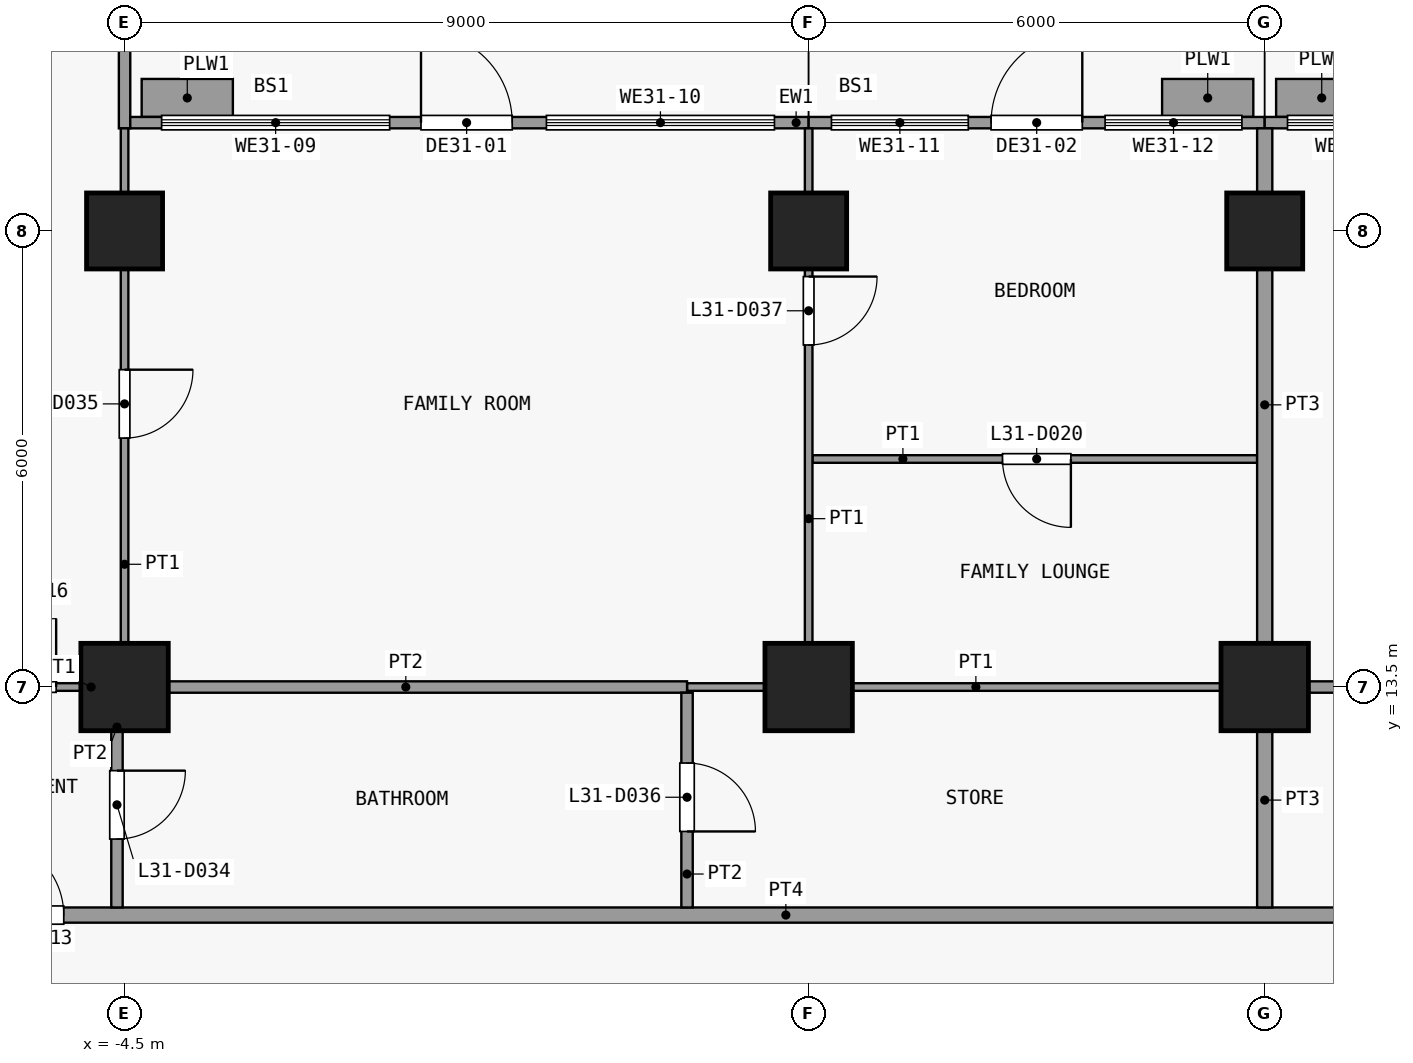
"""IFC4 building model, lengths in metres.
Left out: names, types, materials, properties, quantities, classifications, styles, units other than length and angle.
Written with IfcOpenShell. Run it as: python <this file> out.ifc"""

import sys

from ifc_helpers import new_model, si_unit, direction, frame, frame_2d, origin, origin_2d, place, context, subcontext, project, spatial, rectangle, extrude, element, fill, save


model = new_model("IFC4")
c1 = context("Model", 3, precision=1e-05, world=origin(), true_north=direction((0.0, 1.0)))
c2 = subcontext(c1, "Body", "Model", "MODEL_VIEW")
j1 = project(units=[si_unit("LENGTHUNIT", "METRE"), si_unit("PLANEANGLEUNIT", "RADIAN")], contexts=[c1])
p1 = place(None, origin())
s1 = spatial("IfcSite", under=j1, at=p1, CompositionType="ELEMENT")
p2 = place(p1, origin())
s2 = spatial("IfcBuilding", under=s1, at=p2, CompositionType="ELEMENT")
p3 = place(p2, frame((0.0, 0.0, 124.3)))
s3 = spatial("IfcBuildingStorey", under=s2, at=p3, CompositionType="ELEMENT", Elevation=124.3)
p4 = place(p3, frame((-4.5, 13.5, 0.0), z_axis=(0.0, 0.0, 1.0), x_axis=(1.0, 0.0, 0.0)))
e1 = element("IfcColumn", 1, at=p4, inside=s3, PredefinedType="COLUMN", context=c2, shape_type="SweptSolid", body=[
    extrude(rectangle(XDim=1.15, YDim=1.15, at=origin_2d()), origin(), (0.0, 0.0, 1.0), 3.6),
])
p5 = place(p3, frame((-4.5, 19.5, 0.0), z_axis=(0.0, 0.0, 1.0), x_axis=(1.0, 0.0, 0.0)))
e2 = element("IfcColumn", 2, at=p5, inside=s3, PredefinedType="COLUMN", context=c2, shape_type="SweptSolid", body=[
    extrude(rectangle(XDim=1.0, YDim=1.0, at=origin_2d()), origin(), (0.0, 0.0, 1.0), 3.6),
])
p6 = place(p3, frame((4.5, 13.5, 0.0), z_axis=(0.0, 0.0, 1.0), x_axis=(1.0, 0.0, 0.0)))
e3 = element("IfcColumn", 3, at=p6, inside=s3, PredefinedType="COLUMN", context=c2, shape_type="SweptSolid", body=[
    extrude(rectangle(XDim=1.15, YDim=1.15, at=origin_2d()), origin(), (0.0, 0.0, 1.0), 3.6),
])
p7 = place(p3, frame((4.5, 19.5, 0.0), z_axis=(0.0, 0.0, 1.0), x_axis=(1.0, 0.0, 0.0)))
e4 = element("IfcColumn", 4, at=p7, inside=s3, PredefinedType="COLUMN", context=c2, shape_type="SweptSolid", body=[
    extrude(rectangle(XDim=1.0, YDim=1.0, at=origin_2d()), origin(), (0.0, 0.0, 1.0), 3.6),
])
p8 = place(p3, frame((10.5, 13.5, 0.0), z_axis=(0.0, 0.0, 1.0), x_axis=(1.0, 0.0, 0.0)))
e5 = element("IfcColumn", 5, at=p8, inside=s3, PredefinedType="COLUMN", context=c2, shape_type="SweptSolid", body=[
    extrude(rectangle(XDim=1.15, YDim=1.15, at=origin_2d()), origin(), (0.0, 0.0, 1.0), 3.6),
])
p9 = place(p3, frame((10.5, 19.5, 0.0), z_axis=(0.0, 0.0, 1.0), x_axis=(1.0, 0.0, 0.0)))
e6 = element("IfcColumn", 6, at=p9, inside=s3, PredefinedType="COLUMN", context=c2, shape_type="SweptSolid", body=[
    extrude(rectangle(XDim=1.0, YDim=1.0, at=origin_2d()), origin(), (0.0, 0.0, 1.0), 3.6),
])
p10 = place(p3, frame((-4.5, 20.85, 0.0), z_axis=(0.0, 0.0, 1.0), x_axis=(0.0, 1.0, 0.0)))
e7 = element("IfcWall", 7, at=p10, inside=s3, PredefinedType="SOLIDWALL", context=c2, shape_type="SweptSolid", body=[
    extrude(rectangle(XDim=2.55, YDim=0.15, at=frame_2d((1.275, 0.0))), origin(), (0.0, 0.0, 1.0), 3.3),
])
p11 = place(p3, frame((-4.425, 20.925, 0.0), z_axis=(0.0, 0.0, 1.0), x_axis=(1.0, 0.0, 0.0)))
e8 = element("IfcWall", 8, at=p11, inside=s3, PredefinedType="SOLIDWALL", context=c2, shape_type="SweptSolid", body=[
    extrude(rectangle(XDim=8.925, YDim=0.15, at=frame_2d((4.462, 0.0))), origin(), (0.0, 0.0, 1.0), 3.3),
])
p12 = place(p11, frame((3.825, 0.0, 0.0)))
e9 = element("IfcOpeningElement", 9, at=p12, cuts=e8, PredefinedType="OPENING", context=c2, shape_type="SweptSolid", body=[
    extrude(rectangle(XDim=1.2, YDim=2.4, at=frame_2d((0.6, 1.2))), frame((0.0, 0.085, 0.0), z_axis=(0.0, -1.0, 0.0), x_axis=(1.0, 0.0, 0.0)), (0.0, 0.0, 1.0), 0.17),
])
p13 = place(p11, frame((0.413, 0.0, 0.9)))
e10 = element("IfcOpeningElement", 10, at=p13, cuts=e8, PredefinedType="OPENING", context=c2, shape_type="SweptSolid", body=[
    extrude(rectangle(XDim=3.0, YDim=2.1, at=frame_2d((1.5, 1.05))), frame((0.0, 0.085, 0.0), z_axis=(0.0, -1.0, 0.0), x_axis=(1.0, 0.0, 0.0)), (0.0, 0.0, 1.0), 0.17),
])
p14 = place(p11, frame((5.475, 0.0, 0.9)))
e11 = element("IfcOpeningElement", 11, at=p14, cuts=e8, PredefinedType="OPENING", context=c2, shape_type="SweptSolid", body=[
    extrude(rectangle(XDim=3.0, YDim=2.1, at=frame_2d((1.5, 1.05))), frame((0.0, 0.085, 0.0), z_axis=(0.0, -1.0, 0.0), x_axis=(1.0, 0.0, 0.0)), (0.0, 0.0, 1.0), 0.17),
])
p15 = place(p3, frame((-4.275, 21.25, 0.0), z_axis=(0.0, 0.0, 1.0), x_axis=(1.0, 0.0, 0.0)))
e12 = element("IfcWall", 12, at=p15, inside=s3, PredefinedType="USERDEFINED", context=c2, shape_type="SweptSolid", body=[
    extrude(rectangle(XDim=1.2, YDim=0.5, at=frame_2d((0.6, 0.0))), origin(), (0.0, 0.0, 1.0), 0.9),
])
p16 = place(p3, frame((4.5, 20.925, 0.0), z_axis=(0.0, 0.0, 1.0), x_axis=(1.0, 0.0, 0.0)))
e13 = element("IfcWall", 13, at=p16, inside=s3, PredefinedType="SOLIDWALL", context=c2, shape_type="SweptSolid", body=[
    extrude(rectangle(XDim=6.0, YDim=0.15, at=frame_2d((3.0, 0.0))), origin(), (0.0, 0.0, 1.0), 3.3),
])
p17 = place(p16, frame((2.4, 0.0, 0.0)))
e14 = element("IfcOpeningElement", 14, at=p17, cuts=e13, PredefinedType="OPENING", context=c2, shape_type="SweptSolid", body=[
    extrude(rectangle(XDim=1.2, YDim=2.4, at=frame_2d((0.6, 1.2))), frame((0.0, 0.085, 0.0), z_axis=(0.0, -1.0, 0.0), x_axis=(1.0, 0.0, 0.0)), (0.0, 0.0, 1.0), 0.17),
])
p18 = place(p16, frame((0.3, 0.0, 0.9)))
e15 = element("IfcOpeningElement", 15, at=p18, cuts=e13, PredefinedType="OPENING", context=c2, shape_type="SweptSolid", body=[
    extrude(rectangle(XDim=1.8, YDim=2.1, at=frame_2d((0.9, 1.05))), frame((0.0, 0.085, 0.0), z_axis=(0.0, -1.0, 0.0), x_axis=(1.0, 0.0, 0.0)), (0.0, 0.0, 1.0), 0.17),
])
p19 = place(p16, frame((3.9, 0.0, 0.9)))
e16 = element("IfcOpeningElement", 16, at=p19, cuts=e13, PredefinedType="OPENING", context=c2, shape_type="SweptSolid", body=[
    extrude(rectangle(XDim=1.8, YDim=2.1, at=frame_2d((0.9, 1.05))), frame((0.0, 0.085, 0.0), z_axis=(0.0, -1.0, 0.0), x_axis=(1.0, 0.0, 0.0)), (0.0, 0.0, 1.0), 0.17),
])
p20 = place(p3, frame((9.15, 21.25, 0.0), z_axis=(0.0, 0.0, 1.0), x_axis=(1.0, 0.0, 0.0)))
e17 = element("IfcWall", 17, at=p20, inside=s3, PredefinedType="USERDEFINED", context=c2, shape_type="SweptSolid", body=[
    extrude(rectangle(XDim=1.2, YDim=0.5, at=frame_2d((0.6, 0.0))), origin(), (0.0, 0.0, 1.0), 0.9),
])
p21 = place(p3, frame((10.5, 20.925, 0.0), z_axis=(0.0, 0.0, 1.0), x_axis=(1.0, 0.0, 0.0)))
e18 = element("IfcWall", 18, at=p21, inside=s3, PredefinedType="SOLIDWALL", context=c2, shape_type="SweptSolid", body=[
    extrude(rectangle(XDim=5.925, YDim=0.15, at=frame_2d((2.962, 0.0))), origin(), (0.0, 0.0, 1.0), 3.3),
])
p22 = place(p21, frame((2.4, 0.0, 0.0)))
e19 = element("IfcOpeningElement", 19, at=p22, cuts=e18, PredefinedType="OPENING", context=c2, shape_type="SweptSolid", body=[
    extrude(rectangle(XDim=1.2, YDim=2.4, at=frame_2d((0.6, 1.2))), frame((0.0, 0.085, 0.0), z_axis=(0.0, -1.0, 0.0), x_axis=(1.0, 0.0, 0.0)), (0.0, 0.0, 1.0), 0.17),
])
p23 = place(p21, frame((0.3, 0.0, 0.9)))
e20 = element("IfcOpeningElement", 20, at=p23, cuts=e18, PredefinedType="OPENING", context=c2, shape_type="SweptSolid", body=[
    extrude(rectangle(XDim=1.8, YDim=2.1, at=frame_2d((0.9, 1.05))), frame((0.0, 0.085, 0.0), z_axis=(0.0, -1.0, 0.0), x_axis=(1.0, 0.0, 0.0)), (0.0, 0.0, 1.0), 0.17),
])
p24 = place(p21, frame((3.863, 0.0, 0.9)))
e21 = element("IfcOpeningElement", 21, at=p24, cuts=e18, PredefinedType="OPENING", context=c2, shape_type="SweptSolid", body=[
    extrude(rectangle(XDim=1.8, YDim=2.1, at=frame_2d((0.9, 1.05))), frame((0.0, 0.085, 0.0), z_axis=(0.0, -1.0, 0.0), x_axis=(1.0, 0.0, 0.0)), (0.0, 0.0, 1.0), 0.17),
])
p25 = place(p3, frame((10.65, 21.25, 0.0), z_axis=(0.0, 0.0, 1.0), x_axis=(1.0, 0.0, 0.0)))
e22 = element("IfcWall", 22, at=p25, inside=s3, PredefinedType="USERDEFINED", context=c2, shape_type="SweptSolid", body=[
    extrude(rectangle(XDim=1.2, YDim=0.5, at=frame_2d((0.6, 0.0))), origin(), (0.0, 0.0, 1.0), 0.9),
])
p26 = place(p3, frame((-25.35, 10.5, 0.0), z_axis=(0.0, 0.0, 1.0), x_axis=(1.0, 0.0, 0.0)))
e23 = element("IfcWall", 23, at=p26, inside=s3, PredefinedType="PARTITIONING", context=c2, shape_type="SweptSolid", body=[
    extrude(rectangle(XDim=49.2, YDim=0.2, at=frame_2d((24.6, 0.0))), origin(), (0.0, 0.0, 1.0), 3.3),
])
p27 = place(p26, frame((4.55, 0.0, 0.0)))
e24 = element("IfcOpeningElement", 24, at=p27, cuts=e23, PredefinedType="OPENING", context=c2, shape_type="SweptSolid", body=[
    extrude(rectangle(XDim=1.0, YDim=2.1, at=frame_2d((0.5, 1.05))), frame((0.0, 0.11, 0.0), z_axis=(0.0, -1.0, 0.0), x_axis=(1.0, 0.0, 0.0)), (0.0, 0.0, 1.0), 0.22),
])
p28 = place(p26, frame((19.05, 0.0, 0.0)))
e25 = element("IfcOpeningElement", 25, at=p28, cuts=e23, PredefinedType="OPENING", context=c2, shape_type="SweptSolid", body=[
    extrude(rectangle(XDim=1.0, YDim=2.1, at=frame_2d((0.5, 1.05))), frame((0.0, 0.11, 0.0), z_axis=(0.0, -1.0, 0.0), x_axis=(1.0, 0.0, 0.0)), (0.0, 0.0, 1.0), 0.22),
])
p29 = place(p26, frame((39.05, 0.0, 0.0)))
e26 = element("IfcOpeningElement", 26, at=p29, cuts=e23, PredefinedType="OPENING", context=c2, shape_type="SweptSolid", body=[
    extrude(rectangle(XDim=1.0, YDim=2.1, at=frame_2d((0.5, 1.05))), frame((0.0, 0.11, 0.0), z_axis=(0.0, -1.0, 0.0), x_axis=(1.0, 0.0, 0.0)), (0.0, 0.0, 1.0), 0.22),
])
p30 = place(p3, frame((-7.0, 13.5, 0.0), z_axis=(0.0, 0.0, 1.0), x_axis=(1.0, 0.0, 0.0)))
e27 = element("IfcWall", 27, at=p30, inside=s3, PredefinedType="PARTITIONING", context=c2, shape_type="SweptSolid", body=[
    extrude(rectangle(XDim=2.4, YDim=0.1, at=frame_2d((1.2, 0.0))), origin(), (0.0, 0.0, 1.0), 3.3),
])
p31 = place(p30, frame((0.7, 0.0, 0.0)))
e28 = element("IfcOpeningElement", 28, at=p31, cuts=e27, PredefinedType="OPENING", context=c2, shape_type="SweptSolid", body=[
    extrude(rectangle(XDim=0.9, YDim=2.1, at=frame_2d((0.45, 1.05))), frame((0.0, 0.06, 0.0), z_axis=(0.0, -1.0, 0.0), x_axis=(1.0, 0.0, 0.0)), (0.0, 0.0, 1.0), 0.12),
])
p32 = place(p3, frame((2.9, 13.5, 0.0), z_axis=(0.0, 0.0, 1.0), x_axis=(1.0, 0.0, 0.0)))
e29 = element("IfcWall", 29, at=p32, inside=s3, PredefinedType="PARTITIONING", context=c2, shape_type="SweptSolid", body=[
    extrude(rectangle(XDim=7.6, YDim=0.1, at=frame_2d((3.8, 0.0))), origin(), (0.0, 0.0, 1.0), 3.3),
])
p33 = place(p3, frame((-4.5, 13.5, 0.0), z_axis=(0.0, 0.0, 1.0), x_axis=(1.0, 0.0, 0.0)))
e30 = element("IfcWall", 30, at=p33, inside=s3, PredefinedType="PARTITIONING", context=c2, shape_type="SweptSolid", body=[
    extrude(rectangle(XDim=7.4, YDim=0.15, at=frame_2d((3.7, 0.0))), origin(), (0.0, 0.0, 1.0), 3.3),
])
p34 = place(p3, frame((10.5, 13.5, 0.0), z_axis=(0.0, 0.0, 1.0), x_axis=(1.0, 0.0, 0.0)))
e31 = element("IfcWall", 31, at=p34, inside=s3, PredefinedType="PARTITIONING", context=c2, shape_type="SweptSolid", body=[
    extrude(rectangle(XDim=2.5, YDim=0.15, at=frame_2d((1.25, 0.0))), origin(), (0.0, 0.0, 1.0), 3.3),
])
p35 = place(p3, frame((4.55, 16.5, 0.0), z_axis=(0.0, 0.0, 1.0), x_axis=(1.0, 0.0, 0.0)))
e32 = element("IfcWall", 32, at=p35, inside=s3, PredefinedType="PARTITIONING", context=c2, shape_type="SweptSolid", body=[
    extrude(rectangle(XDim=5.85, YDim=0.1, at=frame_2d((2.925, 0.0))), origin(), (0.0, 0.0, 1.0), 3.3),
])
p36 = place(p35, frame((2.5, 0.0, 0.0)))
e33 = element("IfcOpeningElement", 33, at=p36, cuts=e32, PredefinedType="OPENING", context=c2, shape_type="SweptSolid", body=[
    extrude(rectangle(XDim=0.9, YDim=2.1, at=frame_2d((0.45, 1.05))), frame((0.0, 0.06, 0.0), z_axis=(0.0, -1.0, 0.0), x_axis=(1.0, 0.0, 0.0)), (0.0, 0.0, 1.0), 0.12),
])
p37 = place(p3, frame((-4.6, 10.6, 0.0), z_axis=(0.0, 0.0, 1.0), x_axis=(0.0, 1.0, 0.0)))
e34 = element("IfcWall", 34, at=p37, inside=s3, PredefinedType="PARTITIONING", context=c2, shape_type="SweptSolid", body=[
    extrude(rectangle(XDim=2.825, YDim=0.15, at=frame_2d((1.413, 0.0))), origin(), (0.0, 0.0, 1.0), 3.3),
])
p38 = place(p37, frame((0.9, 0.0, 0.0)))
e35 = element("IfcOpeningElement", 35, at=p38, cuts=e34, PredefinedType="OPENING", context=c2, shape_type="SweptSolid", body=[
    extrude(rectangle(XDim=0.9, YDim=2.1, at=frame_2d((0.45, 1.05))), frame((0.0, 0.085, 0.0), z_axis=(0.0, -1.0, 0.0), x_axis=(1.0, 0.0, 0.0)), (0.0, 0.0, 1.0), 0.17),
])
p39 = place(p3, frame((-4.5, 13.575, 0.0), z_axis=(0.0, 0.0, 1.0), x_axis=(0.0, 1.0, 0.0)))
e36 = element("IfcWall", 36, at=p39, inside=s3, PredefinedType="PARTITIONING", context=c2, shape_type="SweptSolid", body=[
    extrude(rectangle(XDim=7.275, YDim=0.1, at=frame_2d((3.638, 0.0))), origin(), (0.0, 0.0, 1.0), 3.3),
])
p40 = place(p39, frame((3.2, 0.0, 0.0)))
e37 = element("IfcOpeningElement", 37, at=p40, cuts=e36, PredefinedType="OPENING", context=c2, shape_type="SweptSolid", body=[
    extrude(rectangle(XDim=0.9, YDim=2.1, at=frame_2d((0.45, 1.05))), frame((0.0, 0.06, 0.0), z_axis=(0.0, -1.0, 0.0), x_axis=(1.0, 0.0, 0.0)), (0.0, 0.0, 1.0), 0.12),
])
p41 = place(p3, frame((2.9, 10.6, 0.0), z_axis=(0.0, 0.0, 1.0), x_axis=(0.0, 1.0, 0.0)))
e38 = element("IfcWall", 38, at=p41, inside=s3, PredefinedType="PARTITIONING", context=c2, shape_type="SweptSolid", body=[
    extrude(rectangle(XDim=2.825, YDim=0.15, at=frame_2d((1.413, 0.0))), origin(), (0.0, 0.0, 1.0), 3.3),
])
p42 = place(p41, frame((1.0, 0.0, 0.0)))
e39 = element("IfcOpeningElement", 39, at=p42, cuts=e38, PredefinedType="OPENING", context=c2, shape_type="SweptSolid", body=[
    extrude(rectangle(XDim=0.9, YDim=2.1, at=frame_2d((0.45, 1.05))), frame((0.0, 0.085, 0.0), z_axis=(0.0, -1.0, 0.0), x_axis=(1.0, 0.0, 0.0)), (0.0, 0.0, 1.0), 0.17),
])
p43 = place(p3, frame((4.5, 13.55, 0.0), z_axis=(0.0, 0.0, 1.0), x_axis=(0.0, 1.0, 0.0)))
e40 = element("IfcWall", 40, at=p43, inside=s3, PredefinedType="PARTITIONING", context=c2, shape_type="SweptSolid", body=[
    extrude(rectangle(XDim=7.3, YDim=0.1, at=frame_2d((3.65, 0.0))), origin(), (0.0, 0.0, 1.0), 3.3),
])
p44 = place(p43, frame((4.45, 0.0, 0.0)))
e41 = element("IfcOpeningElement", 41, at=p44, cuts=e40, PredefinedType="OPENING", context=c2, shape_type="SweptSolid", body=[
    extrude(rectangle(XDim=0.9, YDim=2.1, at=frame_2d((0.45, 1.05))), frame((0.0, 0.06, 0.0), z_axis=(0.0, -1.0, 0.0), x_axis=(1.0, 0.0, 0.0)), (0.0, 0.0, 1.0), 0.12),
])
p45 = place(p3, frame((10.5, 10.6, 0.0), z_axis=(0.0, 0.0, 1.0), x_axis=(0.0, 1.0, 0.0)))
e42 = element("IfcWall", 42, at=p45, inside=s3, PredefinedType="PARTITIONING", context=c2, shape_type="SweptSolid", body=[
    extrude(rectangle(XDim=2.825, YDim=0.2, at=frame_2d((1.413, 0.0))), origin(), (0.0, 0.0, 1.0), 3.3),
])
p46 = place(p3, frame((10.5, 13.575, 0.0), z_axis=(0.0, 0.0, 1.0), x_axis=(0.0, 1.0, 0.0)))
e43 = element("IfcWall", 43, at=p46, inside=s3, PredefinedType="PARTITIONING", context=c2, shape_type="SweptSolid", body=[
    extrude(rectangle(XDim=7.275, YDim=0.2, at=frame_2d((3.638, 0.0))), origin(), (0.0, 0.0, 1.0), 3.3),
])
p47 = place(p12, origin())
e44 = element("IfcDoor", 44, at=p47, inside=s3, OperationType="SINGLE_SWING_LEFT", PredefinedType="DOOR", context=c2, shape_type="SweptSolid", body=[
    extrude(rectangle(XDim=1.2, YDim=2.4, at=frame_2d((0.6, 1.2))), frame((0.0, 0.025, 0.0), z_axis=(0.0, -1.0, 0.0), x_axis=(1.0, 0.0, 0.0)), (0.0, 0.0, 1.0), 0.05),
])
fill(e9, e44)
p48 = place(p13, origin())
e45 = element("IfcWindow", 45, at=p48, inside=s3, PartitioningType="SINGLE_PANEL", PredefinedType="WINDOW", context=c2, shape_type="SweptSolid", body=[
    extrude(rectangle(XDim=3.0, YDim=2.1, at=frame_2d((1.5, 1.05))), frame((0.0, 0.03, 0.0), z_axis=(0.0, -1.0, 0.0), x_axis=(1.0, 0.0, 0.0)), (0.0, 0.0, 1.0), 0.06),
])
fill(e10, e45)
p49 = place(p14, origin())
e46 = element("IfcWindow", 46, at=p49, inside=s3, PartitioningType="SINGLE_PANEL", PredefinedType="WINDOW", context=c2, shape_type="SweptSolid", body=[
    extrude(rectangle(XDim=3.0, YDim=2.1, at=frame_2d((1.5, 1.05))), frame((0.0, 0.03, 0.0), z_axis=(0.0, -1.0, 0.0), x_axis=(1.0, 0.0, 0.0)), (0.0, 0.0, 1.0), 0.06),
])
fill(e11, e46)
p50 = place(p17, origin())
e47 = element("IfcDoor", 47, at=p50, inside=s3, OperationType="SINGLE_SWING_RIGHT", PredefinedType="DOOR", context=c2, shape_type="SweptSolid", body=[
    extrude(rectangle(XDim=1.2, YDim=2.4, at=frame_2d((0.6, 1.2))), frame((0.0, 0.025, 0.0), z_axis=(0.0, -1.0, 0.0), x_axis=(1.0, 0.0, 0.0)), (0.0, 0.0, 1.0), 0.05),
])
fill(e14, e47)
p51 = place(p18, origin())
e48 = element("IfcWindow", 48, at=p51, inside=s3, PartitioningType="SINGLE_PANEL", PredefinedType="WINDOW", context=c2, shape_type="SweptSolid", body=[
    extrude(rectangle(XDim=1.8, YDim=2.1, at=frame_2d((0.9, 1.05))), frame((0.0, 0.03, 0.0), z_axis=(0.0, -1.0, 0.0), x_axis=(1.0, 0.0, 0.0)), (0.0, 0.0, 1.0), 0.06),
])
fill(e15, e48)
p52 = place(p19, origin())
e49 = element("IfcWindow", 49, at=p52, inside=s3, PartitioningType="SINGLE_PANEL", PredefinedType="WINDOW", context=c2, shape_type="SweptSolid", body=[
    extrude(rectangle(XDim=1.8, YDim=2.1, at=frame_2d((0.9, 1.05))), frame((0.0, 0.03, 0.0), z_axis=(0.0, -1.0, 0.0), x_axis=(1.0, 0.0, 0.0)), (0.0, 0.0, 1.0), 0.06),
])
fill(e16, e49)
p53 = place(p23, origin())
e50 = element("IfcWindow", 50, at=p53, inside=s3, PartitioningType="SINGLE_PANEL", PredefinedType="WINDOW", context=c2, shape_type="SweptSolid", body=[
    extrude(rectangle(XDim=1.8, YDim=2.1, at=frame_2d((0.9, 1.05))), frame((0.0, 0.03, 0.0), z_axis=(0.0, -1.0, 0.0), x_axis=(1.0, 0.0, 0.0)), (0.0, 0.0, 1.0), 0.06),
])
fill(e20, e50)
p54 = place(p28, origin())
e51 = element("IfcDoor", 51, at=p54, inside=s3, OperationType="SINGLE_SWING_RIGHT", PredefinedType="DOOR", context=c2, shape_type="SweptSolid", body=[
    extrude(rectangle(XDim=1.0, YDim=2.1, at=frame_2d((0.5, 1.05))), frame((0.0, 0.025, 0.0), z_axis=(0.0, -1.0, 0.0), x_axis=(1.0, 0.0, 0.0)), (0.0, 0.0, 1.0), 0.05),
])
fill(e25, e51)
p55 = place(p31, origin())
e52 = element("IfcDoor", 52, at=p55, inside=s3, OperationType="SINGLE_SWING_LEFT", PredefinedType="DOOR", context=c2, shape_type="SweptSolid", body=[
    extrude(rectangle(XDim=0.9, YDim=2.1, at=frame_2d((0.45, 1.05))), frame((0.0, 0.025, 0.0), z_axis=(0.0, -1.0, 0.0), x_axis=(1.0, 0.0, 0.0)), (0.0, 0.0, 1.0), 0.05),
])
fill(e28, e52)
p56 = place(p36, origin())
e53 = element("IfcDoor", 53, at=p56, inside=s3, OperationType="SINGLE_SWING_RIGHT", PredefinedType="DOOR", context=c2, shape_type="SweptSolid", body=[
    extrude(rectangle(XDim=0.9, YDim=2.1, at=frame_2d((0.45, 1.05))), frame((0.0, 0.025, 0.0), z_axis=(0.0, -1.0, 0.0), x_axis=(1.0, 0.0, 0.0)), (0.0, 0.0, 1.0), 0.05),
])
fill(e33, e53)
p57 = place(p38, origin())
e54 = element("IfcDoor", 54, at=p57, inside=s3, OperationType="SINGLE_SWING_RIGHT", PredefinedType="DOOR", context=c2, shape_type="SweptSolid", body=[
    extrude(rectangle(XDim=0.9, YDim=2.1, at=frame_2d((0.45, 1.05))), frame((0.0, 0.025, 0.0), z_axis=(0.0, -1.0, 0.0), x_axis=(1.0, 0.0, 0.0)), (0.0, 0.0, 1.0), 0.05),
])
fill(e35, e54)
p58 = place(p40, origin())
e55 = element("IfcDoor", 55, at=p58, inside=s3, OperationType="SINGLE_SWING_RIGHT", PredefinedType="DOOR", context=c2, shape_type="SweptSolid", body=[
    extrude(rectangle(XDim=0.9, YDim=2.1, at=frame_2d((0.45, 1.05))), frame((0.0, 0.025, 0.0), z_axis=(0.0, -1.0, 0.0), x_axis=(1.0, 0.0, 0.0)), (0.0, 0.0, 1.0), 0.05),
])
fill(e37, e55)
p59 = place(p42, origin())
e56 = element("IfcDoor", 56, at=p59, inside=s3, OperationType="SINGLE_SWING_LEFT", PredefinedType="DOOR", context=c2, shape_type="SweptSolid", body=[
    extrude(rectangle(XDim=0.9, YDim=2.1, at=frame_2d((0.45, 1.05))), frame((0.0, 0.025, 0.0), z_axis=(0.0, -1.0, 0.0), x_axis=(1.0, 0.0, 0.0)), (0.0, 0.0, 1.0), 0.05),
])
fill(e39, e56)
p60 = place(p44, origin())
e57 = element("IfcDoor", 57, at=p60, inside=s3, OperationType="SINGLE_SWING_RIGHT", PredefinedType="DOOR", context=c2, shape_type="SweptSolid", body=[
    extrude(rectangle(XDim=0.9, YDim=2.1, at=frame_2d((0.45, 1.05))), frame((0.0, 0.025, 0.0), z_axis=(0.0, -1.0, 0.0), x_axis=(1.0, 0.0, 0.0)), (0.0, 0.0, 1.0), 0.05),
])
fill(e41, e57)
save(model, sys.argv[1])
